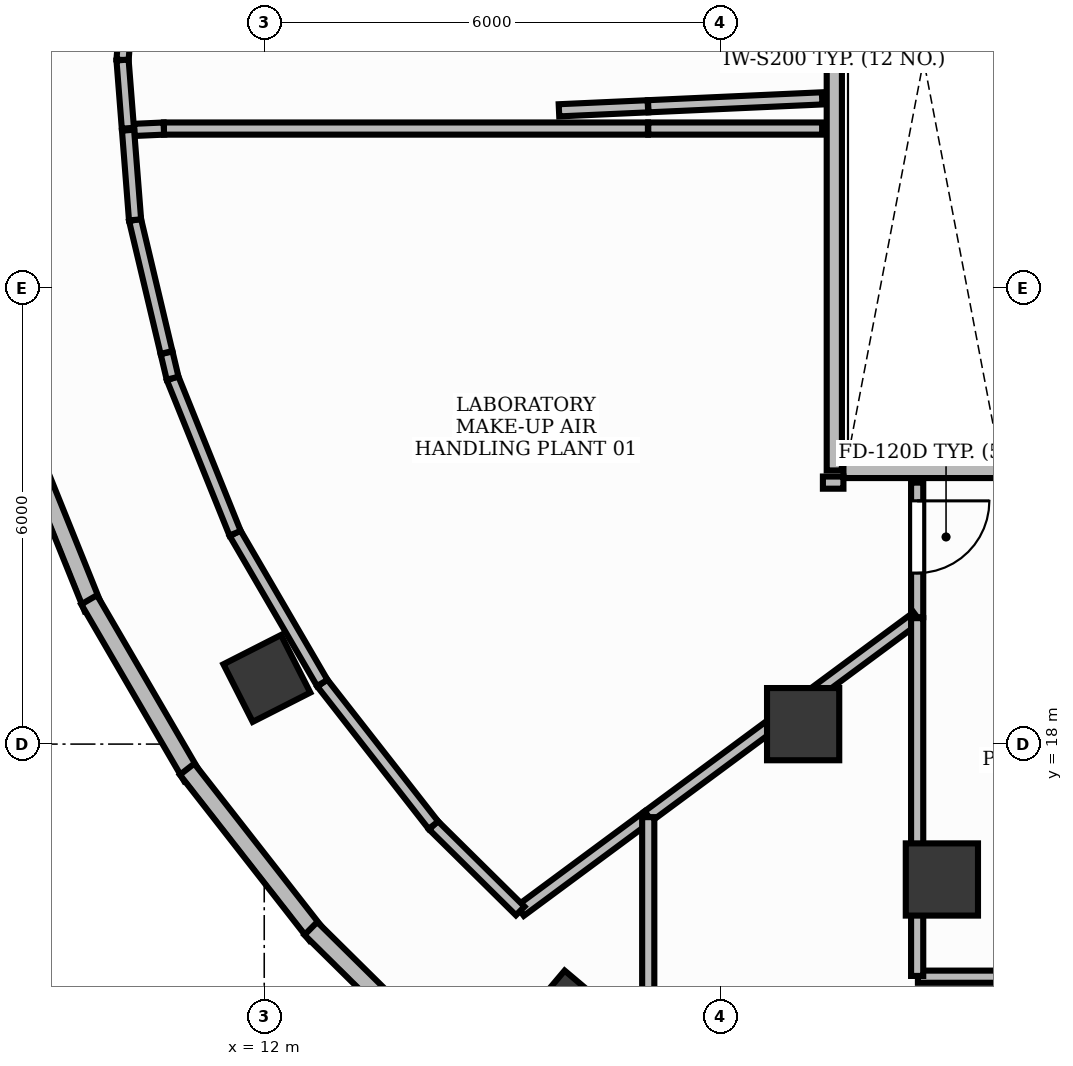
"""IFC4 building model, lengths in metres.
Left out: names, types, materials, properties, quantities, classifications, styles, units other than length and angle.
Written with IfcOpenShell. Run it as: python <this file> out.ifc"""

import sys

from ifc_helpers import new_model, si_unit, direction, frame, frame_2d, origin, origin_2d, place, context, subcontext, project, spatial, rectangle, extrude, element, fill, save


model = new_model("IFC4")
c1 = context("Model", 3, precision=1e-05, world=origin(), true_north=direction((0.0, 1.0)))
c2 = subcontext(c1, "Body", "Model", "MODEL_VIEW")
j1 = project(units=[si_unit("LENGTHUNIT", "METRE"), si_unit("PLANEANGLEUNIT", "RADIAN")], contexts=[c1])
p1 = place(None, origin())
s1 = spatial("IfcSite", under=j1, at=p1, CompositionType="ELEMENT")
p2 = place(p1, origin())
s2 = spatial("IfcBuilding", under=s1, at=p2, CompositionType="ELEMENT")
p3 = place(p2, frame((0.0, 0.0, 277.2)))
s3 = spatial("IfcBuildingStorey", under=s2, at=p3, CompositionType="ELEMENT", Elevation=277.2)
p4 = place(p3, frame((12.034, 18.864, -0.0), z_axis=(0.0, 0.0, 1.0), x_axis=(-0.453057191132, 0.891481453292, 0.0)))
e1 = element("IfcColumn", 1, at=p4, inside=s3, PredefinedType="COLUMN", context=c2, shape_type="SweptSolid", body=[
    extrude(rectangle(XDim=0.85, YDim=0.85, at=origin_2d()), origin(), (0.0, 0.0, 1.0), 5.101),
])
p5 = place(p3, frame((19.09, 18.262, -0.0), z_axis=(0.0, 0.0, 1.0), x_axis=(1.0, 0.0, 0.0)))
e2 = element("IfcColumn", 2, at=p5, inside=s3, PredefinedType="COLUMN", context=c2, shape_type="SweptSolid", body=[
    extrude(rectangle(XDim=0.95, YDim=0.95, at=origin_2d()), origin(), (0.0, 0.0, 1.0), 5.101),
])
p6 = place(p3, frame((16.003, 14.421, -0.0), z_axis=(0.0, 0.0, 1.0), x_axis=(-0.764246456939, 0.644924300253, 0.0)))
e3 = element("IfcColumn", 3, at=p6, inside=s3, PredefinedType="COLUMN", context=c2, shape_type="SweptSolid", body=[
    extrude(rectangle(XDim=0.85, YDim=0.85, at=origin_2d()), origin(), (0.0, 0.0, 1.0), 5.101),
])
p7 = place(p3, frame((20.915, 16.219, -0.0), z_axis=(0.0, 0.0, 1.0), x_axis=(1.0, 0.0, 0.0)))
e4 = element("IfcColumn", 4, at=p7, inside=s3, PredefinedType="COLUMN", context=c2, shape_type="SweptSolid", body=[
    extrude(rectangle(XDim=0.95, YDim=0.95, at=origin_2d()), origin(), (0.0, 0.0, 1.0), 5.101),
])
p8 = place(p3, frame((8.766, 22.229, 0.0), z_axis=(0.0, 0.0, 1.0), x_axis=(0.373969625134, -0.927440952016, 0.0)))
e5 = element("IfcWall", 5, at=p8, inside=s3, PredefinedType="STANDARD", context=c2, shape_type="SweptSolid", body=[
    extrude(rectangle(XDim=2.626, YDim=0.24, at=frame_2d((1.313, 0.0))), origin(), (0.0, 0.0, 1.0), 5.1),
])
p9 = place(p3, frame((9.696, 19.899, 0.0), z_axis=(0.0, 0.0, 1.0), x_axis=(0.503109244551, -0.864222823147, 0.0)))
e6 = element("IfcWall", 6, at=p9, inside=s3, PredefinedType="STANDARD", context=c2, shape_type="SweptSolid", body=[
    extrude(rectangle(XDim=2.691, YDim=0.24, at=frame_2d((1.345, 0.0))), origin(), (0.0, 0.0, 1.0), 5.1),
])
p10 = place(p3, frame((10.985, 17.67, 0.0), z_axis=(0.0, 0.0, 1.0), x_axis=(0.615782644102, -0.78791607118, 0.0)))
e7 = element("IfcWall", 7, at=p10, inside=s3, PredefinedType="STANDARD", context=c2, shape_type="SweptSolid", body=[
    extrude(rectangle(XDim=2.769, YDim=0.24, at=frame_2d((1.384, 0.0))), origin(), (0.0, 0.0, 1.0), 5.1),
])
p11 = place(p3, frame((12.613, 15.574, 0.0), z_axis=(0.0, 0.0, 1.0), x_axis=(0.711370453411, -0.702817243679, 0.0)))
e8 = element("IfcWall", 8, at=p11, inside=s3, PredefinedType="STANDARD", context=c2, shape_type="SweptSolid", body=[
    extrude(rectangle(XDim=2.854, YDim=0.24, at=frame_2d((1.427, 0.0))), origin(), (0.0, 0.0, 1.0), 5.1),
])
p12 = place(p3, frame((19.5, 21.6, 0.0), z_axis=(0.0, 0.0, 1.0), x_axis=(0.0, 1.0, 0.0)))
e9 = element("IfcWall", 9, at=p12, inside=s3, PredefinedType="PARTITIONING", context=c2, shape_type="SweptSolid", body=[
    extrude(rectangle(XDim=10.8, YDim=0.2, at=frame_2d((5.4, 0.0))), origin(), (0.0, 0.0, 1.0), 3.41),
])
p13 = place(p3, frame((19.62, 21.6, 0.0), z_axis=(0.0, 0.0, 1.0), x_axis=(1.0, 0.0, 0.0)))
e10 = element("IfcWall", 10, at=p13, inside=s3, PredefinedType="PARTITIONING", context=c2, shape_type="SweptSolid", body=[
    extrude(rectangle(XDim=2.11, YDim=0.2, at=frame_2d((1.055, 0.0))), origin(), (0.0, 0.0, 1.0), 3.41),
])
p14 = place(p3, frame((20.59, 21.44, 0.0), z_axis=(0.0, 0.0, 1.0), x_axis=(0.0, -1.0, 0.0)))
e11 = element("IfcWall", 11, at=p14, inside=s3, PredefinedType="PARTITIONING", context=c2, shape_type="SweptSolid", body=[
    extrude(rectangle(XDim=1.771, YDim=0.16, at=frame_2d((0.885, 0.0))), origin(), (0.0, 0.0, 1.0), 3.41),
])
p15 = place(p14, frame((0.24, 0.0, 0.0)))
e12 = element("IfcOpeningElement", 12, at=p15, cuts=e11, PredefinedType="OPENING", context=c2, shape_type="SweptSolid", body=[
    extrude(rectangle(XDim=0.95, YDim=2.15, at=frame_2d((0.475, 1.075))), frame((0.0, 0.095, 0.0), z_axis=(0.0, -1.0, 0.0), x_axis=(1.0, 0.0, 0.0)), (0.0, 0.0, 1.0), 0.19),
])
p16 = place(p3, frame((20.6, 14.94, 0.0), z_axis=(0.0, 0.0, 1.0), x_axis=(1.0, 0.0, 0.0)))
e13 = element("IfcWall", 13, at=p16, inside=s3, PredefinedType="PARTITIONING", context=c2, shape_type="SweptSolid", body=[
    extrude(rectangle(XDim=5.0, YDim=0.16, at=frame_2d((2.5, 0.0))), origin(), (0.0, 0.0, 1.0), 3.41),
])
p17 = place(p16, frame((2.794, 0.0, 0.0)))
e14 = element("IfcOpeningElement", 14, at=p17, cuts=e13, PredefinedType="OPENING", context=c2, shape_type="SweptSolid", body=[
    extrude(rectangle(XDim=0.95, YDim=2.15, at=frame_2d((0.475, 1.075))), frame((0.0, 0.095, 0.0), z_axis=(0.0, -1.0, 0.0), x_axis=(1.0, 0.0, 0.0)), (0.0, 0.0, 1.0), 0.19),
])
p18 = place(p3, frame((10.291, 26.08, 0.0), z_axis=(0.0, 0.0, 1.0), x_axis=(0.998982696556, 0.045095143669, 0.0)))
e15 = element("IfcWall", 15, at=p18, inside=s3, PredefinedType="PARTITIONING", context=c2, shape_type="SweptSolid", body=[
    extrude(rectangle(XDim=0.39, YDim=0.16, at=frame_2d((0.195, 0.0))), origin(), (0.0, 0.0, 1.0), 3.41),
])
p19 = place(p3, frame((10.681, 26.098, 0.0), z_axis=(0.0, 0.0, 1.0), x_axis=(1.0, 0.0, 0.0)))
e16 = element("IfcWall", 16, at=p19, inside=s3, PredefinedType="PARTITIONING", context=c2, shape_type="SweptSolid", body=[
    extrude(rectangle(XDim=6.367, YDim=0.16, at=frame_2d((3.184, 0.0))), origin(), (0.0, 0.0, 1.0), 3.41),
])
p20 = place(p3, frame((17.052, 26.098, 0.0), z_axis=(0.0, 0.0, 1.0), x_axis=(1.0, 0.0, 0.0)))
e17 = element("IfcWall", 17, at=p20, inside=s3, PredefinedType="PARTITIONING", context=c2, shape_type="SweptSolid", body=[
    extrude(rectangle(XDim=2.288, YDim=0.16, at=frame_2d((1.144, 0.0))), origin(), (0.0, 0.0, 1.0), 3.41),
])
p21 = place(p3, frame((19.35, 21.44, 0.0), z_axis=(0.0, 0.0, 1.0), x_axis=(1.0, 0.0, 0.0)))
e18 = element("IfcWall", 18, at=p21, inside=s3, PredefinedType="PARTITIONING", context=c2, shape_type="SweptSolid", body=[
    extrude(rectangle(XDim=0.27, YDim=0.16, at=frame_2d((0.135, 0.0))), origin(), (0.0, 0.0, 1.0), 3.41),
])
p22 = place(p3, frame((20.59, 19.669, 0.0), z_axis=(0.0, 0.0, 1.0), x_axis=(-0.803870543648, -0.594804294752, 0.0)))
e19 = element("IfcWall", 19, at=p22, inside=s3, PredefinedType="PARTITIONING", context=c2, shape_type="SweptSolid", body=[
    extrude(rectangle(XDim=4.401, YDim=0.16, at=frame_2d((2.201, 0.0))), origin(), (0.0, 0.0, 1.0), 3.41),
])
p23 = place(p3, frame((17.048, 17.048, 0.0), z_axis=(0.0, 0.0, 1.0), x_axis=(-0.803879877865, -0.594791679467, 0.0)))
e20 = element("IfcWall", 20, at=p23, inside=s3, PredefinedType="PARTITIONING", context=c2, shape_type="SweptSolid", body=[
    extrude(rectangle(XDim=2.09, YDim=0.16, at=frame_2d((1.045, 0.0))), origin(), (0.0, 0.0, 1.0), 3.41),
])
p24 = place(p3, frame((15.367, 15.805, 0.0), z_axis=(0.0, 0.0, 1.0), x_axis=(-0.711354464371, 0.702833426937, 0.0)))
e21 = element("IfcWall", 21, at=p24, inside=s3, PredefinedType="PARTITIONING", context=c2, shape_type="SweptSolid", body=[
    extrude(rectangle(XDim=1.604, YDim=0.16, at=frame_2d((0.802, 0.0))), origin(), (0.0, 0.0, 1.0), 3.41),
])
p25 = place(p3, frame((14.226, 16.933, 0.0), z_axis=(0.0, 0.0, 1.0), x_axis=(-0.615789688094, 0.787910566015, 0.0)))
e22 = element("IfcWall", 22, at=p25, inside=s3, PredefinedType="PARTITIONING", context=c2, shape_type="SweptSolid", body=[
    extrude(rectangle(XDim=2.375, YDim=0.16, at=frame_2d((1.187, 0.0))), origin(), (0.0, 0.0, 1.0), 3.41),
])
p26 = place(p3, frame((12.763, 18.804, 0.0), z_axis=(0.0, 0.0, 1.0), x_axis=(-0.503091477378, 0.864233166101, 0.0)))
e23 = element("IfcWall", 23, at=p26, inside=s3, PredefinedType="PARTITIONING", context=c2, shape_type="SweptSolid", body=[
    extrude(rectangle(XDim=2.279, YDim=0.16, at=frame_2d((1.139, 0.0))), origin(), (0.0, 0.0, 1.0), 3.41),
])
p27 = place(p3, frame((11.617, 20.774, 0.0), z_axis=(0.0, 0.0, 1.0), x_axis=(-0.373992983989, 0.927431532743, 0.0)))
e24 = element("IfcWall", 24, at=p27, inside=s3, PredefinedType="PARTITIONING", context=c2, shape_type="SweptSolid", body=[
    extrude(rectangle(XDim=2.199, YDim=0.16, at=frame_2d((1.099, 0.0))), origin(), (0.0, 0.0, 1.0), 3.41),
])
p28 = place(p3, frame((10.794, 22.813, 0.0), z_axis=(0.0, 0.0, 1.0), x_axis=(-0.230820312517, 0.972996394304, 0.0)))
e25 = element("IfcWall", 25, at=p28, inside=s3, PredefinedType="PARTITIONING", context=c2, shape_type="SweptSolid", body=[
    extrude(rectangle(XDim=0.344, YDim=0.16, at=frame_2d((0.172, 0.0))), origin(), (0.0, 0.0, 1.0), 3.41),
])
p29 = place(p3, frame((10.714, 23.152, 0.0), z_axis=(0.0, 0.0, 1.0), x_axis=(-0.230724309011, 0.973019163856, 0.0)))
e26 = element("IfcWall", 26, at=p29, inside=s3, PredefinedType="PARTITIONING", context=c2, shape_type="SweptSolid", body=[
    extrude(rectangle(XDim=1.792, YDim=0.16, at=frame_2d((0.896, 0.0))), origin(), (0.0, 0.0, 1.0), 3.41),
])
p30 = place(p3, frame((10.301, 24.896, 0.0), z_axis=(0.0, 0.0, 1.0), x_axis=(-0.078179185526, 0.996939323605, 0.0)))
e27 = element("IfcWall", 27, at=p30, inside=s3, PredefinedType="PARTITIONING", context=c2, shape_type="SweptSolid", body=[
    extrude(rectangle(XDim=1.184, YDim=0.16, at=frame_2d((0.592, 0.0))), origin(), (0.0, 0.0, 1.0), 3.41),
])
p31 = place(p3, frame((17.052, 14.367, 0.0), z_axis=(0.0, 0.0, 1.0), x_axis=(0.0, 1.0, 0.0)))
e28 = element("IfcWall", 28, at=p31, inside=s3, PredefinedType="PARTITIONING", context=c2, shape_type="SweptSolid", body=[
    extrude(rectangle(XDim=2.672, YDim=0.16, at=frame_2d((1.336, 0.0))), origin(), (0.0, 0.0, 1.0), 3.41),
])
p32 = place(p3, frame((20.59, 19.657, 0.0), z_axis=(0.0, 0.0, 1.0), x_axis=(0.0, -1.0, 0.0)))
e29 = element("IfcWall", 29, at=p32, inside=s3, PredefinedType="PARTITIONING", context=c2, shape_type="SweptSolid", body=[
    extrude(rectangle(XDim=4.707, YDim=0.16, at=frame_2d((2.354, 0.0))), origin(), (0.0, 0.0, 1.0), 3.41),
])
p33 = place(p3, frame((10.136, 27.0, 0.0), z_axis=(0.0, 0.0, 1.0), x_axis=(0.078103302944, 0.996945271351, 0.0)))
e30 = element("IfcWall", 30, at=p33, inside=s3, PredefinedType="PARTITIONING", context=c2, shape_type="SweptSolid", body=[
    extrude(rectangle(XDim=2.11, YDim=0.16, at=frame_2d((1.055, 0.0))), origin(), (0.0, 0.0, 1.0), 3.41),
])
p34 = place(p3, frame((19.34, 26.495, 0.0), z_axis=(0.0, 0.0, 1.0), x_axis=(-0.99897293198, -0.04531093875, 0.0)))
e31 = element("IfcWall", 31, at=p34, inside=s3, PredefinedType="PARTITIONING", context=c2, shape_type="SweptSolid", body=[
    extrude(rectangle(XDim=2.29, YDim=0.16, at=frame_2d((1.145, 0.0))), origin(), (0.0, 0.0, 1.0), 3.41),
])
p35 = place(p3, frame((17.048, 26.391, 0.0), z_axis=(0.0, 0.0, 1.0), x_axis=(-0.998967680738, -0.045426565374, 0.0)))
e32 = element("IfcWall", 32, at=p35, inside=s3, PredefinedType="PARTITIONING", context=c2, shape_type="SweptSolid", body=[
    extrude(rectangle(XDim=1.172, YDim=0.16, at=frame_2d((0.586, 0.0))), origin(), (0.0, 0.0, 1.0), 3.41),
])
p36 = place(p3, frame((10.206, 26.102, 0.0), z_axis=(0.0, 0.0, 1.0), x_axis=(-0.078085569275, 0.996946660494, 0.0)))
e33 = element("IfcWall", 33, at=p36, inside=s3, PredefinedType="PARTITIONING", context=c2, shape_type="SweptSolid", body=[
    extrude(rectangle(XDim=0.9, YDim=0.16, at=frame_2d((0.45, 0.0))), origin(), (0.0, 0.0, 1.0), 3.41),
])
p37 = place(p15, origin())
e34 = element("IfcDoor", 34, at=p37, inside=s3, OperationType="SINGLE_SWING_LEFT", PredefinedType="DOOR", context=c2, shape_type="SweptSolid", body=[
    extrude(rectangle(XDim=0.95, YDim=2.15, at=frame_2d((0.475, 1.075))), frame((0.0, 0.025, 0.0), z_axis=(0.0, -1.0, 0.0), x_axis=(1.0, 0.0, 0.0)), (0.0, 0.0, 1.0), 0.05),
])
fill(e12, e34)
save(model, sys.argv[1])
